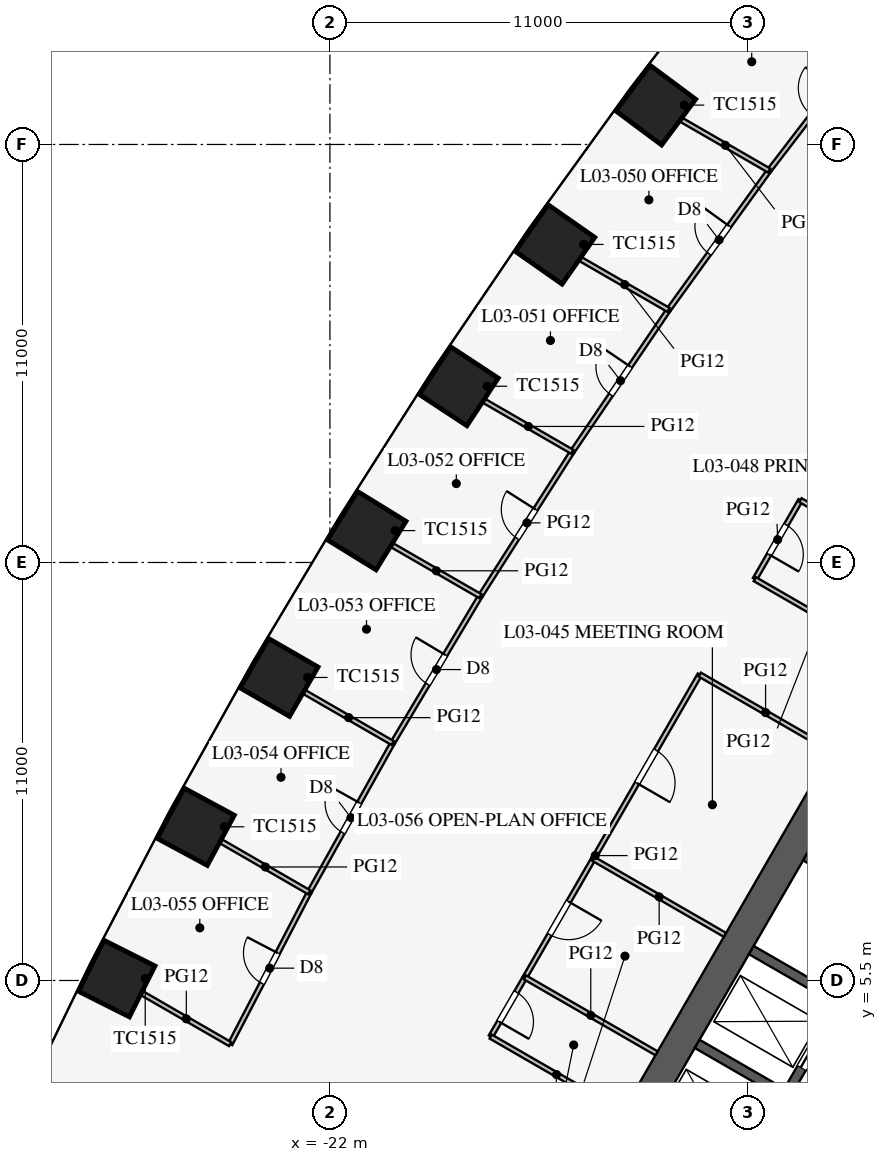
"""IFC4 building model, lengths in metres.
Left out: names, types, materials, properties, quantities, classifications, styles, units other than length and angle.
Written with IfcOpenShell. Run it as: python <this file> out.ifc"""

import sys

from ifc_helpers import new_model, si_unit, direction, frame, frame_2d, origin, origin_2d, place, context, subcontext, project, spatial, rectangle, extrude, element, fill, save


model = new_model("IFC4")
c1 = context("Model", 3, precision=1e-05, world=origin(), true_north=direction((0.0, 1.0)))
c2 = subcontext(c1, "Body", "Model", "MODEL_VIEW")
j1 = project(units=[si_unit("LENGTHUNIT", "METRE"), si_unit("PLANEANGLEUNIT", "RADIAN")], contexts=[c1])
p1 = place(None, origin())
s1 = spatial("IfcSite", under=j1, at=p1, CompositionType="ELEMENT")
p2 = place(p1, origin())
s2 = spatial("IfcBuilding", under=s1, at=p2, CompositionType="ELEMENT")
p3 = place(p2, frame((0.0, 0.0, 16.5)))
s3 = spatial("IfcBuildingStorey", under=s2, at=p3, CompositionType="ELEMENT", Elevation=16.5)
for number, where, z_axis, x_axis in (
    (1, (-13.426, 28.536, 0.0), (0.0, 0.0, 1.0), (-0.597, -0.802, 0.0)),
    (2, (-16.076, 24.87, 0.0), (0.0, 0.0, 1.0), (-0.574, -0.819, 0.0)),
    (3, (-18.611, 21.137, 0.0), (0.0, 0.0, 1.0), (-0.549, -0.836, 0.0)),
    (4, (-21.031, 17.339, 0.0), (0.0, 0.0, 1.0), (-0.525, -0.851, 0.0)),
    (5, (-23.338, 13.474, 0.0), (0.0, 0.0, 1.0), (-0.5, -0.866, 0.0)),
    (6, (-25.531, 9.544, 0.0), (0.0, 0.0, 1.0), (-0.475, -0.88, 0.0)),
    (7, (-27.611, 5.549, 0.0), (0.0, 0.0, 1.0), (-0.449, -0.894, 0.0)),
):
    element("IfcColumn", number, at=place(p3, frame(where, z_axis=z_axis, x_axis=x_axis)), inside=s3, PredefinedType="COLUMN", context=c2, shape_type="SweptSolid", body=[
        extrude(rectangle(XDim=1.5, YDim=1.5, at=origin_2d()), origin(), (0.0, 0.0, 1.0), 4.2),
    ])
p4 = place(p3, frame((-5.773, 16.0, 0.0), z_axis=(0.0, 0.0, 1.0), x_axis=(-0.500002442456, -0.866023993627, 0.0)))
e8 = element("IfcWall", 8, at=p4, inside=s3, PredefinedType="SHEAR", context=c2, shape_type="SweptSolid", body=[
    extrude(rectangle(XDim=21.939, YDim=0.8, at=frame_2d((10.97, 0.0))), origin(), (0.0, 0.0, 1.0), 4.2),
])
p5 = place(p4, frame((17.27, 0.0, 0.0)))
e9 = element("IfcOpeningElement", 9, at=p5, cuts=e8, PredefinedType="OPENING", context=c2, shape_type="SweptSolid", body=[
    extrude(rectangle(XDim=1.2, YDim=2.1, at=frame_2d((0.6, 1.05))), frame((0.0, 0.41, 0.0), z_axis=(0.0, -1.0, 0.0), x_axis=(1.0, 0.0, 0.0)), (0.0, 0.0, 1.0), 0.82),
])
p6 = place(p4, frame((3.47, 0.0, 0.0)))
e10 = element("IfcOpeningElement", 10, at=p6, cuts=e8, PredefinedType="OPENING", context=c2, shape_type="SweptSolid", body=[
    extrude(rectangle(XDim=1.2, YDim=2.1, at=frame_2d((0.6, 1.05))), frame((0.0, 0.41, 0.0), z_axis=(0.0, -1.0, 0.0), x_axis=(1.0, 0.0, 0.0)), (0.0, 0.0, 1.0), 0.82),
])
p7 = place(p3, frame((-5.724, 9.886, 0.0), z_axis=(0.0, 0.0, 1.0), x_axis=(-0.500001763848, -0.866024385424, 0.0)))
e11 = element("IfcWall", 11, at=p7, inside=s3, PredefinedType="SHEAR", context=c2, shape_type="SweptSolid", body=[
    extrude(rectangle(XDim=11.4, YDim=0.25, at=frame_2d((5.7, 0.0))), origin(), (0.0, 0.0, 1.0), 4.2),
])
p8 = place(p7, frame((6.525, 0.0, 0.0)))
e12 = element("IfcOpeningElement", 12, at=p8, cuts=e11, PredefinedType="OPENING", context=c2, shape_type="SweptSolid", body=[
    extrude(rectangle(XDim=1.2, YDim=2.2, at=frame_2d((0.6, 1.1))), frame((0.0, 0.135, 0.0), z_axis=(0.0, -1.0, 0.0), x_axis=(1.0, 0.0, 0.0)), (0.0, 0.0, 1.0), 0.27),
])
p9 = place(p7, frame((9.375, 0.0, 0.0)))
e13 = element("IfcOpeningElement", 13, at=p9, cuts=e11, PredefinedType="OPENING", context=c2, shape_type="SweptSolid", body=[
    extrude(rectangle(XDim=1.2, YDim=2.2, at=frame_2d((0.6, 1.1))), frame((0.0, 0.135, 0.0), z_axis=(0.0, -1.0, 0.0), x_axis=(1.0, 0.0, 0.0)), (0.0, 0.0, 1.0), 0.27),
])
for number, where, z_axis, x_axis in (
    (14, (-7.257, 7.481, 0.0), (0.0, 0.0, 1.0), (-0.866, 0.5, 0.0)),
    (15, (-8.682, 5.012, 0.0), (0.0, 0.0, 1.0), (-0.866, 0.5, 0.0)),
    (16, (-10.107, 2.544, 0.0), (0.0, 0.0, 1.0), (-0.866, 0.5, 0.0)),
):
    element("IfcWall", number, at=place(p3, frame(where, z_axis=z_axis, x_axis=x_axis)), inside=s3, PredefinedType="SHEAR", context=c2, shape_type="SweptSolid", body=[
        extrude(rectangle(XDim=2.575, YDim=0.25, at=frame_2d((1.288, 0.0))), origin(), (0.0, 0.0, 1.0), 4.2),
    ])
p10 = place(p3, frame((-16.869, 5.582, 0.0), z_axis=(0.0, 0.0, 1.0), x_axis=(-0.499961193289, -0.866047807691, 0.0)))
e17 = element("IfcWall", 17, at=p10, inside=s3, PredefinedType="PARTITIONING", context=c2, shape_type="SweptSolid", body=[
    extrude(rectangle(XDim=1.8, YDim=0.12, at=frame_2d((0.9, 0.0))), origin(), (0.0, 0.0, 1.0), 2.9),
])
p11 = place(p10, frame((0.45, 0.0, 0.15)))
e18 = element("IfcOpeningElement", 18, at=p11, cuts=e17, PredefinedType="OPENING", context=c2, shape_type="SweptSolid", body=[
    extrude(rectangle(XDim=0.9, YDim=2.1, at=frame_2d((0.45, 1.05))), frame((0.0, 0.07, 0.0), z_axis=(0.0, -1.0, 0.0), x_axis=(1.0, 0.0, 0.0)), (0.0, 0.0, 1.0), 0.14),
])
p12 = place(p3, frame((-15.069, 8.7, 0.0), z_axis=(0.0, 0.0, 1.0), x_axis=(-0.500012057535, -0.866018442252, 0.0)))
e19 = element("IfcWall", 19, at=p12, inside=s3, PredefinedType="PARTITIONING", context=c2, shape_type="SweptSolid", body=[
    extrude(rectangle(XDim=3.6, YDim=0.12, at=frame_2d((1.8, 0.0))), origin(), (0.0, 0.0, 1.0), 2.9),
])
p13 = place(p12, frame((1.3, 0.0, 0.15)))
e20 = element("IfcOpeningElement", 20, at=p13, cuts=e19, PredefinedType="OPENING", context=c2, shape_type="SweptSolid", body=[
    extrude(rectangle(XDim=1.0, YDim=2.1, at=frame_2d((0.5, 1.05))), frame((0.0, 0.07, 0.0), z_axis=(0.0, -1.0, 0.0), x_axis=(1.0, 0.0, 0.0)), (0.0, 0.0, 1.0), 0.14),
])
p14 = place(p3, frame((-9.619, 18.14, 0.0), z_axis=(0.0, 0.0, 1.0), x_axis=(-0.500001309137, -0.866024647952, 0.0)))
e21 = element("IfcWall", 21, at=p14, inside=s3, PredefinedType="PARTITIONING", context=c2, shape_type="SweptSolid", body=[
    extrude(rectangle(XDim=2.4, YDim=0.12, at=frame_2d((1.2, 0.0))), origin(), (0.0, 0.0, 1.0), 2.9),
])
p15 = place(p14, frame((0.75, 0.0, 0.15)))
e22 = element("IfcOpeningElement", 22, at=p15, cuts=e21, PredefinedType="OPENING", context=c2, shape_type="SweptSolid", body=[
    extrude(rectangle(XDim=0.9, YDim=2.1, at=frame_2d((0.45, 1.05))), frame((0.0, 0.07, 0.0), z_axis=(0.0, -1.0, 0.0), x_axis=(1.0, 0.0, 0.0)), (0.0, 0.0, 1.0), 0.14),
])
p16 = place(p3, frame((-12.269, 13.55, 0.0), z_axis=(0.0, 0.0, 1.0), x_axis=(-0.49999793692, -0.866026594901, 0.0)))
e23 = element("IfcWall", 23, at=p16, inside=s3, PredefinedType="PARTITIONING", context=c2, shape_type="SweptSolid", body=[
    extrude(rectangle(XDim=5.6, YDim=0.12, at=frame_2d((2.8, 0.0))), origin(), (0.0, 0.0, 1.0), 2.9),
])
p17 = place(p16, frame((2.3, 0.0, 0.15)))
e24 = element("IfcOpeningElement", 24, at=p17, cuts=e23, PredefinedType="OPENING", context=c2, shape_type="SweptSolid", body=[
    extrude(rectangle(XDim=1.0, YDim=2.1, at=frame_2d((0.5, 1.05))), frame((0.0, 0.07, 0.0), z_axis=(0.0, -1.0, 0.0), x_axis=(1.0, 0.0, 0.0)), (0.0, 0.0, 1.0), 0.14),
])
for number, where, z_axis, x_axis in (
    (25, (-13.405, 3.582, 0.0), (0.0, 0.0, 1.0), (-0.866, 0.5, 0.0)),
    (26, (-14.305, 2.023, 0.0), (0.0, 0.0, 1.0), (-0.866, 0.5, 0.0)),
    (27, (-11.605, 6.7, 0.0), (0.0, 0.0, 1.0), (-0.866, 0.5, 0.0)),
    (28, (-6.155, 16.14, 0.0), (0.0, 0.0, 1.0), (-0.866, 0.5, 0.0)),
    (29, (-8.805, 11.55, 0.0), (0.0, 0.0, 1.0), (-0.866, 0.5, 0.0)),
    (30, (-7.355, 14.061, 0.0), (0.0, 0.0, 1.0), (-0.866, 0.5, 0.0)),
):
    element("IfcWall", number, at=place(p3, frame(where, z_axis=z_axis, x_axis=x_axis)), inside=s3, PredefinedType="PARTITIONING", context=c2, shape_type="SweptSolid", body=[
        extrude(rectangle(XDim=4.0, YDim=0.12, at=frame_2d((2.0, 0.0))), origin(), (0.0, 0.0, 1.0), 2.9),
    ])
p18 = place(p3, frame((-20.351, 11.749, 0.0), z_axis=(0.0, 0.0, 1.0), x_axis=(-0.487373854787, -0.873193406795, 0.0)))
e31 = element("IfcWall", 31, at=p18, inside=s3, PredefinedType="PARTITIONING", context=c2, shape_type="SweptSolid", body=[
    extrude(rectangle(XDim=4.5, YDim=0.12, at=frame_2d((2.25, 0.0))), origin(), (0.0, 0.0, 1.0), 2.9),
])
p19 = place(p18, frame((1.8, 0.0, 0.15)))
e32 = element("IfcOpeningElement", 32, at=p19, cuts=e31, PredefinedType="OPENING", context=c2, shape_type="SweptSolid", body=[
    extrude(rectangle(XDim=0.9, YDim=2.1, at=frame_2d((0.45, 1.05))), frame((0.0, 0.07, 0.0), z_axis=(0.0, -1.0, 0.0), x_axis=(1.0, 0.0, 0.0)), (0.0, 0.0, 1.0), 0.14),
])
p20 = place(p3, frame((-22.544, 7.82, 0.0), z_axis=(0.0, 0.0, 1.0), x_axis=(-0.461810056307, -0.886978845235, 0.0)))
e33 = element("IfcWall", 33, at=p20, inside=s3, PredefinedType="PARTITIONING", context=c2, shape_type="SweptSolid", body=[
    extrude(rectangle(XDim=4.504, YDim=0.12, at=frame_2d((2.252, 0.0))), origin(), (0.0, 0.0, 1.0), 2.9),
])
p21 = place(p20, frame((1.8, 0.0, 0.15)))
e34 = element("IfcOpeningElement", 34, at=p21, cuts=e33, PredefinedType="OPENING", context=c2, shape_type="SweptSolid", body=[
    extrude(rectangle(XDim=0.9, YDim=2.1, at=frame_2d((0.45, 1.05))), frame((0.0, 0.07, 0.0), z_axis=(0.0, -1.0, 0.0), x_axis=(1.0, 0.0, 0.0)), (0.0, 0.0, 1.0), 0.14),
])
p22 = place(p3, frame((-13.091, 23.146, 0.0), z_axis=(0.0, 0.0, 1.0), x_axis=(-0.561512004239, -0.827468591002, 0.0)))
e35 = element("IfcWall", 35, at=p22, inside=s3, PredefinedType="PARTITIONING", context=c2, shape_type="SweptSolid", body=[
    extrude(rectangle(XDim=4.512, YDim=0.12, at=frame_2d((2.256, 0.0))), origin(), (0.0, 0.0, 1.0), 2.9),
])
p23 = place(p22, frame((1.8, 0.0, 0.15)))
e36 = element("IfcOpeningElement", 36, at=p23, cuts=e35, PredefinedType="OPENING", context=c2, shape_type="SweptSolid", body=[
    extrude(rectangle(XDim=0.9, YDim=2.1, at=frame_2d((0.45, 1.05))), frame((0.0, 0.07, 0.0), z_axis=(0.0, -1.0, 0.0), x_axis=(1.0, 0.0, 0.0)), (0.0, 0.0, 1.0), 0.14),
])
p24 = place(p3, frame((-10.443, 26.814, 0.0), z_axis=(0.0, 0.0, 1.0), x_axis=(-0.58534077607, -0.810787380187, 0.0)))
e37 = element("IfcWall", 37, at=p24, inside=s3, PredefinedType="PARTITIONING", context=c2, shape_type="SweptSolid", body=[
    extrude(rectangle(XDim=4.523, YDim=0.12, at=frame_2d((2.262, 0.0))), origin(), (0.0, 0.0, 1.0), 2.9),
])
p25 = place(p24, frame((1.8, 0.0, 0.15)))
e38 = element("IfcOpeningElement", 38, at=p25, cuts=e37, PredefinedType="OPENING", context=c2, shape_type="SweptSolid", body=[
    extrude(rectangle(XDim=0.9, YDim=2.1, at=frame_2d((0.45, 1.05))), frame((0.0, 0.07, 0.0), z_axis=(0.0, -1.0, 0.0), x_axis=(1.0, 0.0, 0.0)), (0.0, 0.0, 1.0), 0.14),
])
p26 = place(p3, frame((-7.679, 30.415, 0.0), z_axis=(0.0, 0.0, 1.0), x_axis=(-0.608818785139, -0.79330932609, 0.0)))
e39 = element("IfcWall", 39, at=p26, inside=s3, PredefinedType="PARTITIONING", context=c2, shape_type="SweptSolid", body=[
    extrude(rectangle(XDim=4.539, YDim=0.12, at=frame_2d((2.27, 0.0))), origin(), (0.0, 0.0, 1.0), 2.9),
])
p27 = place(p26, frame((1.8, 0.0, 0.15)))
e40 = element("IfcOpeningElement", 40, at=p27, cuts=e39, PredefinedType="OPENING", context=c2, shape_type="SweptSolid", body=[
    extrude(rectangle(XDim=0.9, YDim=2.1, at=frame_2d((0.45, 1.05))), frame((0.0, 0.07, 0.0), z_axis=(0.0, -1.0, 0.0), x_axis=(1.0, 0.0, 0.0)), (0.0, 0.0, 1.0), 0.14),
])
p28 = place(p3, frame((-18.044, 15.614, 0.0), z_axis=(0.0, 0.0, 1.0), x_axis=(-0.51252396108, -0.858672923364, 0.0)))
e41 = element("IfcWall", 41, at=p28, inside=s3, PredefinedType="PARTITIONING", context=c2, shape_type="SweptSolid", body=[
    extrude(rectangle(XDim=4.5, YDim=0.12, at=frame_2d((2.25, 0.0))), origin(), (0.0, 0.0, 1.0), 2.9),
])
p29 = place(p28, frame((1.8, 0.0, 0.15)))
e42 = element("IfcOpeningElement", 42, at=p29, cuts=e41, PredefinedType="OPENING", context=c2, shape_type="SweptSolid", body=[
    extrude(rectangle(XDim=0.9, YDim=2.1, at=frame_2d((0.45, 1.05))), frame((0.0, 0.07, 0.0), z_axis=(0.0, -1.0, 0.0), x_axis=(1.0, 0.0, 0.0)), (0.0, 0.0, 1.0), 0.14),
])
p30 = place(p3, frame((-15.624, 19.413, 0.0), z_axis=(0.0, 0.0, 1.0), x_axis=(-0.537243691336, -0.843427066272, 0.0)))
e43 = element("IfcWall", 43, at=p30, inside=s3, PredefinedType="PARTITIONING", context=c2, shape_type="SweptSolid", body=[
    extrude(rectangle(XDim=4.504, YDim=0.12, at=frame_2d((2.252, 0.0))), origin(), (0.0, 0.0, 1.0), 2.9),
])
p31 = place(p30, frame((1.8, 0.0, 0.15)))
e44 = element("IfcOpeningElement", 44, at=p31, cuts=e43, PredefinedType="OPENING", context=c2, shape_type="SweptSolid", body=[
    extrude(rectangle(XDim=0.9, YDim=2.1, at=frame_2d((0.45, 1.05))), frame((0.0, 0.07, 0.0), z_axis=(0.0, -1.0, 0.0), x_axis=(1.0, 0.0, 0.0)), (0.0, 0.0, 1.0), 0.14),
])
p32 = place(p3, frame((-20.351, 11.749, 0.0), z_axis=(0.0, 0.0, 1.0), x_axis=(-0.865989150234, 0.500062787734, 0.0)))
e45 = element("IfcWall", 45, at=p32, inside=s3, PredefinedType="PARTITIONING", context=c2, shape_type="SweptSolid", body=[
    extrude(rectangle(XDim=2.67, YDim=0.12, at=frame_2d((1.335, 0.0))), origin(), (0.0, 0.0, 1.0), 2.9),
])
p33 = place(p3, frame((-22.544, 7.82, 0.0), z_axis=(0.0, 0.0, 1.0), x_axis=(-0.866022619654, 0.500004822225, 0.0)))
e46 = element("IfcWall", 46, at=p33, inside=s3, PredefinedType="PARTITIONING", context=c2, shape_type="SweptSolid", body=[
    extrude(rectangle(XDim=2.669, YDim=0.12, at=frame_2d((1.335, 0.0))), origin(), (0.0, 0.0, 1.0), 2.9),
])
p34 = place(p3, frame((-24.624, 3.824, 0.0), z_axis=(0.0, 0.0, 1.0), x_axis=(-0.866020974757, 0.500007671222, 0.0)))
e47 = element("IfcWall", 47, at=p34, inside=s3, PredefinedType="PARTITIONING", context=c2, shape_type="SweptSolid", body=[
    extrude(rectangle(XDim=2.667, YDim=0.12, at=frame_2d((1.334, 0.0))), origin(), (0.0, 0.0, 1.0), 2.9),
])
p35 = place(p3, frame((-13.091, 23.146, 0.0), z_axis=(0.0, 0.0, 1.0), x_axis=(-0.866023818221, 0.500002746266, 0.0)))
e48 = element("IfcWall", 48, at=p35, inside=s3, PredefinedType="PARTITIONING", context=c2, shape_type="SweptSolid", body=[
    extrude(rectangle(XDim=2.664, YDim=0.12, at=frame_2d((1.332, 0.0))), origin(), (0.0, 0.0, 1.0), 2.9),
])
p36 = place(p3, frame((-10.443, 26.814, 0.0), z_axis=(0.0, 0.0, 1.0), x_axis=(-0.866031171652, 0.499990009627, 0.0)))
e49 = element("IfcWall", 49, at=p36, inside=s3, PredefinedType="PARTITIONING", context=c2, shape_type="SweptSolid", body=[
    extrude(rectangle(XDim=2.659, YDim=0.12, at=frame_2d((1.33, 0.0))), origin(), (0.0, 0.0, 1.0), 2.9),
])
p37 = place(p3, frame((-18.044, 15.614, 0.0), z_axis=(0.0, 0.0, 1.0), x_axis=(-0.866022619654, 0.500004822225, 0.0)))
e50 = element("IfcWall", 50, at=p37, inside=s3, PredefinedType="PARTITIONING", context=c2, shape_type="SweptSolid", body=[
    extrude(rectangle(XDim=2.669, YDim=0.12, at=frame_2d((1.335, 0.0))), origin(), (0.0, 0.0, 1.0), 2.9),
])
p38 = place(p3, frame((-15.624, 19.413, 0.0), z_axis=(0.0, 0.0, 1.0), x_axis=(-0.866020974757, 0.500007671222, 0.0)))
e51 = element("IfcWall", 51, at=p38, inside=s3, PredefinedType="PARTITIONING", context=c2, shape_type="SweptSolid", body=[
    extrude(rectangle(XDim=2.667, YDim=0.12, at=frame_2d((1.334, 0.0))), origin(), (0.0, 0.0, 1.0), 2.9),
])
p39 = place(p17, origin())
e52 = element("IfcDoor", 52, at=p39, inside=s3, OperationType="SINGLE_SWING_RIGHT", PredefinedType="DOOR", context=c2, shape_type="SweptSolid", body=[
    extrude(rectangle(XDim=1.0, YDim=2.1, at=frame_2d((0.5, 1.05))), frame((0.0, 0.025, 0.0), z_axis=(0.0, -1.0, 0.0), x_axis=(1.0, 0.0, 0.0)), (0.0, 0.0, 1.0), 0.05),
])
fill(e24, e52)
p40 = place(p13, origin())
e53 = element("IfcDoor", 53, at=p40, inside=s3, OperationType="SINGLE_SWING_LEFT", PredefinedType="DOOR", context=c2, shape_type="SweptSolid", body=[
    extrude(rectangle(XDim=1.0, YDim=2.1, at=frame_2d((0.5, 1.05))), frame((0.0, 0.025, 0.0), z_axis=(0.0, -1.0, 0.0), x_axis=(1.0, 0.0, 0.0)), (0.0, 0.0, 1.0), 0.05),
])
fill(e20, e53)
p41 = place(p11, origin())
e54 = element("IfcDoor", 54, at=p41, inside=s3, OperationType="SINGLE_SWING_RIGHT", PredefinedType="DOOR", context=c2, shape_type="SweptSolid", body=[
    extrude(rectangle(XDim=0.9, YDim=2.1, at=frame_2d((0.45, 1.05))), frame((0.0, 0.025, 0.0), z_axis=(0.0, -1.0, 0.0), x_axis=(1.0, 0.0, 0.0)), (0.0, 0.0, 1.0), 0.05),
])
fill(e18, e54)
p42 = place(p15, origin())
e55 = element("IfcDoor", 55, at=p42, inside=s3, OperationType="SINGLE_SWING_RIGHT", PredefinedType="DOOR", context=c2, shape_type="SweptSolid", body=[
    extrude(rectangle(XDim=0.9, YDim=2.1, at=frame_2d((0.45, 1.05))), frame((0.0, 0.025, 0.0), z_axis=(0.0, -1.0, 0.0), x_axis=(1.0, 0.0, 0.0)), (0.0, 0.0, 1.0), 0.05),
])
fill(e22, e55)
p43 = place(p25, frame((0.9, 0.0, 0.0), z_axis=(0.0, 0.0, 1.0), x_axis=(-1.0, 0.0, 0.0)))
e56 = element("IfcDoor", 56, at=p43, inside=s3, OperationType="SINGLE_SWING_RIGHT", PredefinedType="DOOR", context=c2, shape_type="SweptSolid", body=[
    extrude(rectangle(XDim=0.9, YDim=2.1, at=frame_2d((0.45, 1.05))), frame((0.0, 0.025, 0.0), z_axis=(0.0, -1.0, 0.0), x_axis=(1.0, 0.0, 0.0)), (0.0, 0.0, 1.0), 0.05),
])
fill(e38, e56)
p44 = place(p23, frame((0.9, 0.0, 0.0), z_axis=(0.0, 0.0, 1.0), x_axis=(-1.0, 0.0, 0.0)))
e57 = element("IfcDoor", 57, at=p44, inside=s3, OperationType="SINGLE_SWING_RIGHT", PredefinedType="DOOR", context=c2, shape_type="SweptSolid", body=[
    extrude(rectangle(XDim=0.9, YDim=2.1, at=frame_2d((0.45, 1.05))), frame((0.0, 0.025, 0.0), z_axis=(0.0, -1.0, 0.0), x_axis=(1.0, 0.0, 0.0)), (0.0, 0.0, 1.0), 0.05),
])
fill(e36, e57)
p45 = place(p31, frame((0.9, 0.0, 0.0), z_axis=(0.0, 0.0, 1.0), x_axis=(-1.0, 0.0, 0.0)))
e58 = element("IfcDoor", 58, at=p45, inside=s3, OperationType="SINGLE_SWING_RIGHT", PredefinedType="DOOR", context=c2, shape_type="SweptSolid", body=[
    extrude(rectangle(XDim=0.9, YDim=2.1, at=frame_2d((0.45, 1.05))), frame((0.0, 0.025, 0.0), z_axis=(0.0, -1.0, 0.0), x_axis=(1.0, 0.0, 0.0)), (0.0, 0.0, 1.0), 0.05),
])
fill(e44, e58)
p46 = place(p29, frame((0.9, 0.0, 0.0), z_axis=(0.0, 0.0, 1.0), x_axis=(-1.0, 0.0, 0.0)))
e59 = element("IfcDoor", 59, at=p46, inside=s3, OperationType="SINGLE_SWING_RIGHT", PredefinedType="DOOR", context=c2, shape_type="SweptSolid", body=[
    extrude(rectangle(XDim=0.9, YDim=2.1, at=frame_2d((0.45, 1.05))), frame((0.0, 0.025, 0.0), z_axis=(0.0, -1.0, 0.0), x_axis=(1.0, 0.0, 0.0)), (0.0, 0.0, 1.0), 0.05),
])
fill(e42, e59)
p47 = place(p19, frame((0.9, 0.0, 0.0), z_axis=(0.0, 0.0, 1.0), x_axis=(-1.0, 0.0, 0.0)))
e60 = element("IfcDoor", 60, at=p47, inside=s3, OperationType="SINGLE_SWING_RIGHT", PredefinedType="DOOR", context=c2, shape_type="SweptSolid", body=[
    extrude(rectangle(XDim=0.9, YDim=2.1, at=frame_2d((0.45, 1.05))), frame((0.0, 0.025, 0.0), z_axis=(0.0, -1.0, 0.0), x_axis=(1.0, 0.0, 0.0)), (0.0, 0.0, 1.0), 0.05),
])
fill(e32, e60)
p48 = place(p21, frame((0.9, 0.0, 0.0), z_axis=(0.0, 0.0, 1.0), x_axis=(-1.0, 0.0, 0.0)))
e61 = element("IfcDoor", 61, at=p48, inside=s3, OperationType="SINGLE_SWING_RIGHT", PredefinedType="DOOR", context=c2, shape_type="SweptSolid", body=[
    extrude(rectangle(XDim=0.9, YDim=2.1, at=frame_2d((0.45, 1.05))), frame((0.0, 0.025, 0.0), z_axis=(0.0, -1.0, 0.0), x_axis=(1.0, 0.0, 0.0)), (0.0, 0.0, 1.0), 0.05),
])
fill(e34, e61)
p49 = place(p8, origin())
e62 = element("IfcDoor", 62, at=p49, inside=s3, OperationType="DOUBLE_DOOR_SLIDING", PredefinedType="DOOR", context=c2, shape_type="SweptSolid", body=[
    extrude(rectangle(XDim=1.2, YDim=2.2, at=frame_2d((0.6, 1.1))), frame((0.0, 0.025, 0.0), z_axis=(0.0, -1.0, 0.0), x_axis=(1.0, 0.0, 0.0)), (0.0, 0.0, 1.0), 0.05),
])
fill(e12, e62)
save(model, sys.argv[1])
